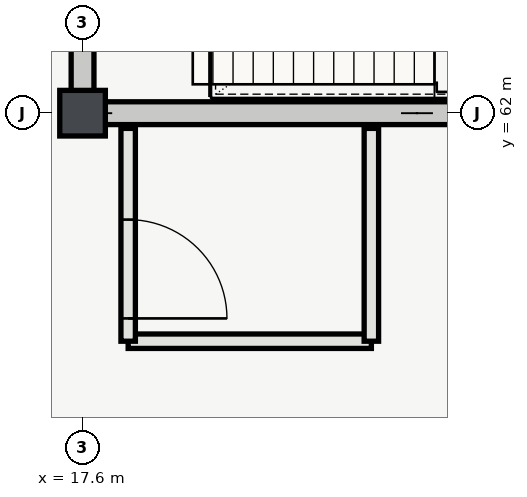
"""IFC4 building model, lengths in metres.
Left out: names, types, materials, properties, quantities, classifications, styles, units other than length and angle.
Written with IfcOpenShell. Run it as: python <this file> out.ifc"""

import sys

from ifc_helpers import new_model, si_unit, direction, frame, frame_2d, origin, origin_2d, place, context, subcontext, project, spatial, rectangle, extrude, element, fill, save


model = new_model("IFC4")
c1 = context("Model", 3, precision=1e-05, world=origin(), true_north=direction((0.0, 1.0)))
c2 = subcontext(c1, "Body", "Model", "MODEL_VIEW")
j1 = project(units=[si_unit("LENGTHUNIT", "METRE"), si_unit("PLANEANGLEUNIT", "RADIAN")], contexts=[c1])
p1 = place(None, origin())
s1 = spatial("IfcSite", under=j1, at=p1, CompositionType="ELEMENT")
p2 = place(p1, origin())
s2 = spatial("IfcBuilding", under=s1, at=p2, CompositionType="ELEMENT")
p3 = place(p2, frame((0.0, 0.0, 28.8)))
s3 = spatial("IfcBuildingStorey", under=s2, at=p3, CompositionType="ELEMENT", Elevation=28.8)
p4 = place(p3, frame((17.6, 62.0, 0.0), z_axis=(0.0, 0.0, 1.0), x_axis=(1.0, 0.0, 0.0)))
e1 = element("IfcColumn", 1, at=p4, inside=s3, PredefinedType="COLUMN", context=c2, shape_type="SweptSolid", body=[
    extrude(rectangle(XDim=0.6, YDim=0.6, at=origin_2d()), origin(), (0.0, 0.0, 1.0), 4.2),
])
p5 = place(p3, frame((17.45, 62.0, 0.0), z_axis=(0.0, 0.0, 1.0), x_axis=(1.0, 0.0, 0.0)))
e2 = element("IfcWall", 2, at=p5, inside=s3, PredefinedType="SHEAR", context=c2, shape_type="SweptSolid", body=[
    extrude(rectangle(XDim=9.1, YDim=0.3, at=frame_2d((4.55, 0.0))), origin(), (0.0, 0.0, 1.0), 3.92),
])
p6 = place(p3, frame((17.6, 62.15, 0.0), z_axis=(0.0, 0.0, 1.0), x_axis=(0.0, 1.0, 0.0)))
e3 = element("IfcWall", 3, at=p6, inside=s3, PredefinedType="SHEAR", context=c2, shape_type="SweptSolid", body=[
    extrude(rectangle(XDim=7.7, YDim=0.3, at=frame_2d((3.85, 0.0))), origin(), (0.0, 0.0, 1.0), 3.92),
])
p7 = place(p6, frame((1.65, 0.0, 0.0)))
e4 = element("IfcOpeningElement", 4, at=p7, cuts=e3, PredefinedType="OPENING", context=c2, shape_type="SweptSolid", body=[
    extrude(rectangle(XDim=1.4, YDim=2.2, at=frame_2d((0.7, 1.1))), frame((0.0, 0.16, 0.0), z_axis=(0.0, -1.0, 0.0), x_axis=(1.0, 0.0, 0.0)), (0.0, 0.0, 1.0), 0.32),
])
p8 = place(p6, frame((5.7, 0.0, 0.0)))
e5 = element("IfcOpeningElement", 5, at=p8, cuts=e3, PredefinedType="OPENING", context=c2, shape_type="SweptSolid", body=[
    extrude(rectangle(XDim=1.0, YDim=2.15, at=frame_2d((0.5, 1.075))), frame((0.0, 0.16, 0.0), z_axis=(0.0, -1.0, 0.0), x_axis=(1.0, 0.0, 0.0)), (0.0, 0.0, 1.0), 0.32),
])
p9 = place(p3, frame((18.2, 59.0, 0.0), z_axis=(0.0, 0.0, 1.0), x_axis=(1.0, 0.0, 0.0)))
e6 = element("IfcWall", 6, at=p9, inside=s3, PredefinedType="PARTITIONING", context=c2, shape_type="SweptSolid", body=[
    extrude(rectangle(XDim=3.2, YDim=0.19, at=frame_2d((1.6, 0.0))), origin(), (0.0, 0.0, 1.0), 3.92),
])
p10 = place(p3, frame((18.2, 61.8, 0.0), z_axis=(0.0, 0.0, 1.0), x_axis=(0.0, -1.0, 0.0)))
e7 = element("IfcWall", 7, at=p10, inside=s3, PredefinedType="PARTITIONING", context=c2, shape_type="SweptSolid", body=[
    extrude(rectangle(XDim=2.8, YDim=0.19, at=frame_2d((1.4, 0.0))), origin(), (0.0, 0.0, 1.0), 3.92),
])
p11 = place(p10, frame((1.2, 0.0, 0.0)))
e8 = element("IfcOpeningElement", 8, at=p11, cuts=e7, PredefinedType="OPENING", context=c2, shape_type="SweptSolid", body=[
    extrude(rectangle(XDim=1.3, YDim=2.2, at=frame_2d((0.65, 1.1))), frame((0.0, 0.105, 0.0), z_axis=(0.0, -1.0, 0.0), x_axis=(1.0, 0.0, 0.0)), (0.0, 0.0, 1.0), 0.21),
])
p12 = place(p3, frame((21.4, 59.0, 0.0), z_axis=(0.0, 0.0, 1.0), x_axis=(0.0, 1.0, 0.0)))
e9 = element("IfcWall", 9, at=p12, inside=s3, PredefinedType="PARTITIONING", context=c2, shape_type="SweptSolid", body=[
    extrude(rectangle(XDim=2.8, YDim=0.19, at=frame_2d((1.4, 0.0))), origin(), (0.0, 0.0, 1.0), 3.92),
])
p13 = place(p11, origin())
e10 = element("IfcDoor", 10, at=p13, inside=s3, OperationType="SINGLE_SWING_RIGHT", PredefinedType="DOOR", context=c2, shape_type="SweptSolid", body=[
    extrude(rectangle(XDim=1.3, YDim=2.2, at=frame_2d((0.65, 1.1))), frame((0.0, 0.025, 0.0), z_axis=(0.0, -1.0, 0.0), x_axis=(1.0, 0.0, 0.0)), (0.0, 0.0, 1.0), 0.05),
])
fill(e8, e10)
save(model, sys.argv[1])
